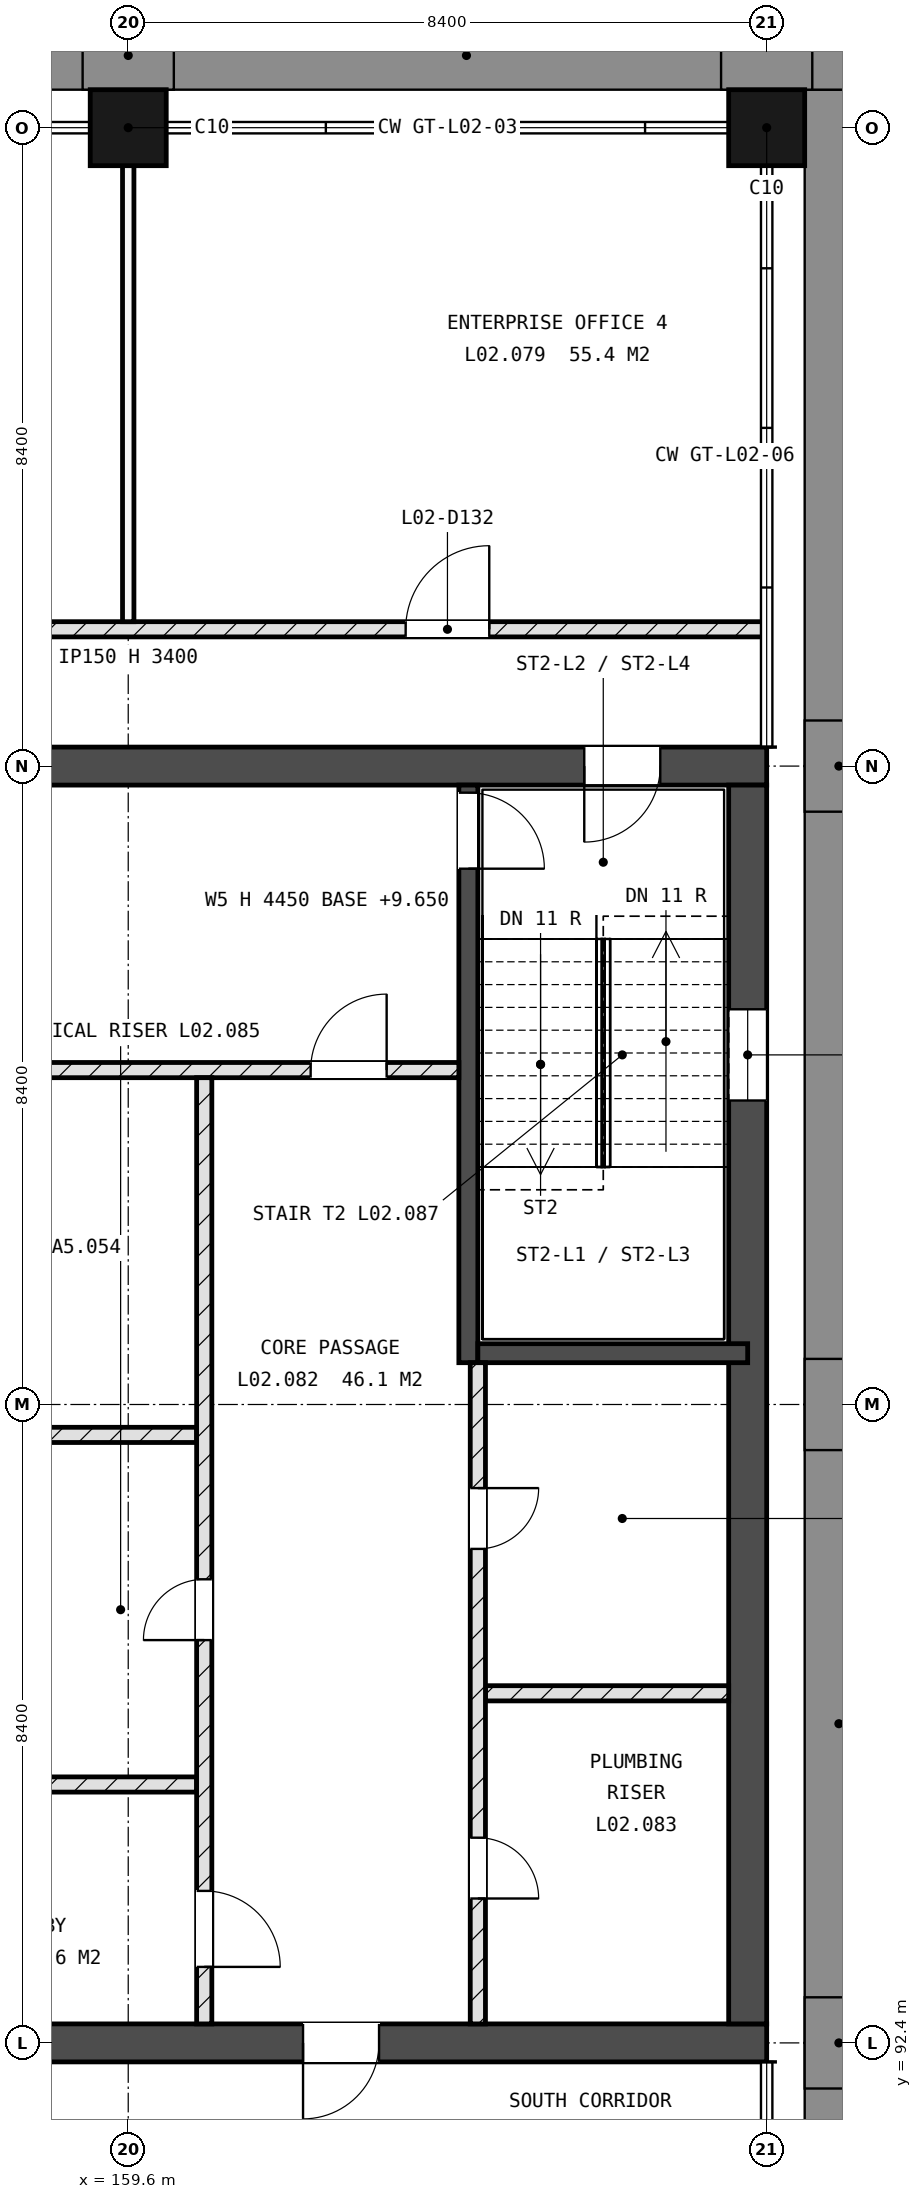
"""IFC4 building model, lengths in metres.
Left out: names, types, materials, properties, quantities, classifications, styles, units other than length and angle.
Written with IfcOpenShell. Run it as: python <this file> out.ifc"""

import sys

from ifc_helpers import new_model, si_unit, direction, frame, frame_2d, origin, origin_2d, place, context, subcontext, project, spatial, rectangle, extrude, element, fill, save


model = new_model("IFC4")
c1 = context("Model", 3, precision=1e-05, world=origin(), true_north=direction((0.0, 1.0)))
c2 = subcontext(c1, "Body", "Model", "MODEL_VIEW")
j1 = project(units=[si_unit("LENGTHUNIT", "METRE"), si_unit("PLANEANGLEUNIT", "RADIAN")], contexts=[c1])
p1 = place(None, origin())
s1 = spatial("IfcSite", under=j1, at=p1, CompositionType="ELEMENT")
p2 = place(p1, origin())
s2 = spatial("IfcBuilding", under=s1, at=p2, CompositionType="ELEMENT")
p3 = place(p2, frame((0.0, 0.0, 9.9)))
s3 = spatial("IfcBuildingStorey", under=s2, at=p3, CompositionType="ELEMENT", Elevation=9.9)
for number, where, z_axis, x_axis in (
    (1, (159.6, 117.6, -0.25), (0.0, 0.0, 1.0), (1.0, 0.0, 0.0)),
    (2, (168.0, 117.6, -0.25), (0.0, 0.0, 1.0), (1.0, 0.0, 0.0)),
):
    element("IfcColumn", number, at=place(p3, frame(where, z_axis=z_axis, x_axis=x_axis)), inside=s3, PredefinedType="COLUMN", context=c2, shape_type="SweptSolid", body=[
        extrude(rectangle(XDim=1.0, YDim=1.0, at=origin_2d()), origin(), (0.0, 0.0, 1.0), 4.45),
    ])
p4 = place(p3, frame((142.8, 92.4, -0.25), z_axis=(0.0, 0.0, 1.0), x_axis=(1.0, 0.0, 0.0)))
e3 = element("IfcWall", 3, at=p4, inside=s3, PredefinedType="SHEAR", context=c2, shape_type="SweptSolid", body=[
    extrude(rectangle(XDim=25.2, YDim=0.5, at=frame_2d((12.6, 0.0))), origin(), (0.0, 0.0, 1.0), 4.45),
])
p5 = place(p4, frame((1.4, 0.0, 0.25)))
e4 = element("IfcOpeningElement", 4, at=p5, cuts=e3, PredefinedType="OPENING", context=c2, shape_type="SweptSolid", body=[
    extrude(rectangle(XDim=1.0, YDim=2.1, at=frame_2d((0.5, 1.05))), frame((0.0, 0.26, 0.0), z_axis=(0.0, -1.0, 0.0), x_axis=(1.0, 0.0, 0.0)), (0.0, 0.0, 1.0), 0.52),
])
p6 = place(p4, frame((19.1, 0.0, 0.25)))
e5 = element("IfcOpeningElement", 5, at=p6, cuts=e3, PredefinedType="OPENING", context=c2, shape_type="SweptSolid", body=[
    extrude(rectangle(XDim=1.0, YDim=2.1, at=frame_2d((0.5, 1.05))), frame((0.0, 0.26, 0.0), z_axis=(0.0, -1.0, 0.0), x_axis=(1.0, 0.0, 0.0)), (0.0, 0.0, 1.0), 0.52),
])
p7 = place(p4, frame((10.4, 0.0, 0.25)))
e6 = element("IfcOpeningElement", 6, at=p7, cuts=e3, PredefinedType="OPENING", context=c2, shape_type="SweptSolid", body=[
    extrude(rectangle(XDim=1.0, YDim=2.1, at=frame_2d((0.5, 1.05))), frame((0.0, 0.26, 0.0), z_axis=(0.0, -1.0, 0.0), x_axis=(1.0, 0.0, 0.0)), (0.0, 0.0, 1.0), 0.52),
])
p8 = place(p3, frame((142.8, 109.2, -0.25), z_axis=(0.0, 0.0, 1.0), x_axis=(1.0, 0.0, 0.0)))
e7 = element("IfcWall", 7, at=p8, inside=s3, PredefinedType="SHEAR", context=c2, shape_type="SweptSolid", body=[
    extrude(rectangle(XDim=25.2, YDim=0.5, at=frame_2d((12.6, 0.0))), origin(), (0.0, 0.0, 1.0), 4.45),
])
p9 = place(p8, frame((22.8, 0.0, 0.25)))
e8 = element("IfcOpeningElement", 8, at=p9, cuts=e7, PredefinedType="OPENING", context=c2, shape_type="SweptSolid", body=[
    extrude(rectangle(XDim=1.0, YDim=2.1, at=frame_2d((0.5, 1.05))), frame((0.0, 0.26, 0.0), z_axis=(0.0, -1.0, 0.0), x_axis=(1.0, 0.0, 0.0)), (0.0, 0.0, 1.0), 0.52),
])
p10 = place(p8, frame((1.5, 0.0, 0.25)))
e9 = element("IfcOpeningElement", 9, at=p10, cuts=e7, PredefinedType="OPENING", context=c2, shape_type="SweptSolid", body=[
    extrude(rectangle(XDim=0.8, YDim=2.1, at=frame_2d((0.4, 1.05))), frame((0.0, 0.26, 0.0), z_axis=(0.0, -1.0, 0.0), x_axis=(1.0, 0.0, 0.0)), (0.0, 0.0, 1.0), 0.52),
])
p11 = place(p8, frame((13.4, 0.0, 0.25)))
e10 = element("IfcOpeningElement", 10, at=p11, cuts=e7, PredefinedType="OPENING", context=c2, shape_type="SweptSolid", body=[
    extrude(rectangle(XDim=1.0, YDim=2.1, at=frame_2d((0.5, 1.05))), frame((0.0, 0.26, 0.0), z_axis=(0.0, -1.0, 0.0), x_axis=(1.0, 0.0, 0.0)), (0.0, 0.0, 1.0), 0.52),
])
p12 = place(p3, frame((167.75, 92.65, -0.25), z_axis=(0.0, 0.0, 1.0), x_axis=(0.0, 1.0, 0.0)))
e11 = element("IfcWall", 11, at=p12, inside=s3, PredefinedType="SHEAR", context=c2, shape_type="SweptSolid", body=[
    extrude(rectangle(XDim=16.3, YDim=0.5, at=frame_2d((8.15, 0.0))), origin(), (0.0, 0.0, 1.0), 4.45),
])
p13 = place(p12, frame((12.15, 0.0, 1.85)))
e12 = element("IfcOpeningElement", 12, at=p13, cuts=e11, PredefinedType="OPENING", context=c2, shape_type="SweptSolid", body=[
    extrude(rectangle(XDim=1.2, YDim=0.9, at=frame_2d((0.6, 0.45))), frame((0.0, 0.26, 0.0), z_axis=(0.0, -1.0, 0.0), x_axis=(1.0, 0.0, 0.0)), (0.0, 0.0, 1.0), 0.52),
])
p14 = place(p3, frame((164.075, 101.35, -0.25), z_axis=(0.0, 0.0, 1.0), x_axis=(0.0, 1.0, 0.0)))
e13 = element("IfcWall", 13, at=p14, inside=s3, PredefinedType="SHEAR", context=c2, shape_type="SweptSolid", body=[
    extrude(rectangle(XDim=7.6, YDim=0.25, at=frame_2d((3.8, 0.0))), origin(), (0.0, 0.0, 1.0), 4.45),
])
p15 = place(p14, frame((6.5, 0.0, 0.25)))
e14 = element("IfcOpeningElement", 14, at=p15, cuts=e13, PredefinedType="OPENING", context=c2, shape_type="SweptSolid", body=[
    extrude(rectangle(XDim=1.0, YDim=2.1, at=frame_2d((0.5, 1.05))), frame((0.0, 0.135, 0.0), z_axis=(0.0, -1.0, 0.0), x_axis=(1.0, 0.0, 0.0)), (0.0, 0.0, 1.0), 0.27),
])
p16 = place(p3, frame((164.2, 101.475, -0.25), z_axis=(0.0, 0.0, 1.0), x_axis=(1.0, 0.0, 0.0)))
e15 = element("IfcWall", 15, at=p16, inside=s3, PredefinedType="SHEAR", context=c2, shape_type="SweptSolid", body=[
    extrude(rectangle(XDim=3.55, YDim=0.25, at=frame_2d((1.775, 0.0))), origin(), (0.0, 0.0, 1.0), 4.45),
])
p17 = place(p3, frame((158.25, 95.8, 0.0), z_axis=(0.0, 0.0, 1.0), x_axis=(1.0, 0.0, 0.0)))
e16 = element("IfcWall", 16, at=p17, inside=s3, PredefinedType="SOLIDWALL", context=c2, shape_type="SweptSolid", body=[
    extrude(rectangle(XDim=2.25, YDim=0.2, at=frame_2d((1.125, 0.0))), origin(), (0.0, 0.0, 1.0), 4.2),
])
p18 = place(p3, frame((164.3, 97.0, 0.0), z_axis=(0.0, 0.0, 1.0), x_axis=(1.0, 0.0, 0.0)))
e17 = element("IfcWall", 17, at=p18, inside=s3, PredefinedType="SOLIDWALL", context=c2, shape_type="SweptSolid", body=[
    extrude(rectangle(XDim=3.2, YDim=0.2, at=frame_2d((1.6, 0.0))), origin(), (0.0, 0.0, 1.0), 4.2),
])
p19 = place(p3, frame((146.5, 100.4, 0.0), z_axis=(0.0, 0.0, 1.0), x_axis=(1.0, 0.0, 0.0)))
e18 = element("IfcWall", 18, at=p19, inside=s3, PredefinedType="SOLIDWALL", context=c2, shape_type="SweptSolid", body=[
    extrude(rectangle(XDim=14.0, YDim=0.2, at=frame_2d((7.0, 0.0))), origin(), (0.0, 0.0, 1.0), 4.2),
])
p20 = place(p3, frame((143.3, 105.2, 0.0), z_axis=(0.0, 0.0, 1.0), x_axis=(1.0, 0.0, 0.0)))
e19 = element("IfcWall", 19, at=p20, inside=s3, PredefinedType="SOLIDWALL", context=c2, shape_type="SweptSolid", body=[
    extrude(rectangle(XDim=20.65, YDim=0.2, at=frame_2d((10.325, 0.0))), origin(), (0.0, 0.0, 1.0), 4.2),
])
p21 = place(p20, frame((11.4, 0.0, 0.0)))
e20 = element("IfcOpeningElement", 20, at=p21, cuts=e19, PredefinedType="OPENING", context=c2, shape_type="SweptSolid", body=[
    extrude(rectangle(XDim=0.8, YDim=2.1, at=frame_2d((0.4, 1.05))), frame((0.0, 0.11, 0.0), z_axis=(0.0, -1.0, 0.0), x_axis=(1.0, 0.0, 0.0)), (0.0, 0.0, 1.0), 0.22),
])
p22 = place(p20, frame((18.7, 0.0, 0.0)))
e21 = element("IfcOpeningElement", 21, at=p22, cuts=e19, PredefinedType="OPENING", context=c2, shape_type="SweptSolid", body=[
    extrude(rectangle(XDim=1.0, YDim=2.1, at=frame_2d((0.5, 1.05))), frame((0.0, 0.11, 0.0), z_axis=(0.0, -1.0, 0.0), x_axis=(1.0, 0.0, 0.0)), (0.0, 0.0, 1.0), 0.22),
])
p23 = place(p3, frame((142.8, 111.0, 0.0), z_axis=(0.0, 0.0, 1.0), x_axis=(1.0, 0.0, 0.0)))
e22 = element("IfcWall", 22, at=p23, inside=s3, PredefinedType="SOLIDWALL", context=c2, shape_type="SweptSolid", body=[
    extrude(rectangle(XDim=25.2, YDim=0.2, at=frame_2d((12.6, 0.0))), origin(), (0.0, 0.0, 1.0), 4.2),
])
p24 = place(p23, frame((3.65, 0.0, 0.0)))
e23 = element("IfcOpeningElement", 23, at=p24, cuts=e22, PredefinedType="OPENING", context=c2, shape_type="SweptSolid", body=[
    extrude(rectangle(XDim=1.1, YDim=2.25, at=frame_2d((0.55, 1.125))), frame((0.0, 0.11, 0.0), z_axis=(0.0, -1.0, 0.0), x_axis=(1.0, 0.0, 0.0)), (0.0, 0.0, 1.0), 0.22),
])
p25 = place(p23, frame((12.05, 0.0, 0.0)))
e24 = element("IfcOpeningElement", 24, at=p25, cuts=e22, PredefinedType="OPENING", context=c2, shape_type="SweptSolid", body=[
    extrude(rectangle(XDim=1.1, YDim=2.25, at=frame_2d((0.55, 1.125))), frame((0.0, 0.11, 0.0), z_axis=(0.0, -1.0, 0.0), x_axis=(1.0, 0.0, 0.0)), (0.0, 0.0, 1.0), 0.22),
])
p26 = place(p23, frame((20.45, 0.0, 0.0)))
e25 = element("IfcOpeningElement", 25, at=p26, cuts=e22, PredefinedType="OPENING", context=c2, shape_type="SweptSolid", body=[
    extrude(rectangle(XDim=1.1, YDim=2.25, at=frame_2d((0.55, 1.125))), frame((0.0, 0.11, 0.0), z_axis=(0.0, -1.0, 0.0), x_axis=(1.0, 0.0, 0.0)), (0.0, 0.0, 1.0), 0.22),
])
p27 = place(p3, frame((159.6, 111.1, 0.0), z_axis=(0.0, 0.0, 1.0), x_axis=(0.0, 1.0, 0.0)))
e26 = element("IfcWall", 26, at=p27, inside=s3, PredefinedType="PARTITIONING", context=c2, shape_type="SweptSolid", body=[
    extrude(rectangle(XDim=6.5, YDim=0.15, at=frame_2d((3.25, 0.0))), origin(), (0.0, 0.0, 1.0), 3.4),
])
p28 = place(p3, frame((160.6, 92.65, 0.0), z_axis=(0.0, 0.0, 1.0), x_axis=(0.0, 1.0, 0.0)))
e27 = element("IfcWall", 27, at=p28, inside=s3, PredefinedType="SOLIDWALL", context=c2, shape_type="SweptSolid", body=[
    extrude(rectangle(XDim=12.45, YDim=0.2, at=frame_2d((6.225, 0.0))), origin(), (0.0, 0.0, 1.0), 4.2),
])
p29 = place(p28, frame((5.05, 0.0, 0.0)))
e28 = element("IfcOpeningElement", 28, at=p29, cuts=e27, PredefinedType="OPENING", context=c2, shape_type="SweptSolid", body=[
    extrude(rectangle(XDim=0.8, YDim=2.1, at=frame_2d((0.4, 1.05))), frame((0.0, 0.11, 0.0), z_axis=(0.0, -1.0, 0.0), x_axis=(1.0, 0.0, 0.0)), (0.0, 0.0, 1.0), 0.22),
])
p30 = place(p28, frame((0.75, 0.0, 0.0)))
e29 = element("IfcOpeningElement", 29, at=p30, cuts=e27, PredefinedType="OPENING", context=c2, shape_type="SweptSolid", body=[
    extrude(rectangle(XDim=1.0, YDim=2.1, at=frame_2d((0.5, 1.05))), frame((0.0, 0.11, 0.0), z_axis=(0.0, -1.0, 0.0), x_axis=(1.0, 0.0, 0.0)), (0.0, 0.0, 1.0), 0.22),
])
p31 = place(p3, frame((164.2, 92.65, 0.0), z_axis=(0.0, 0.0, 1.0), x_axis=(0.0, 1.0, 0.0)))
e30 = element("IfcWall", 30, at=p31, inside=s3, PredefinedType="SOLIDWALL", context=c2, shape_type="SweptSolid", body=[
    extrude(rectangle(XDim=8.7, YDim=0.2, at=frame_2d((4.35, 0.0))), origin(), (0.0, 0.0, 1.0), 4.2),
])
p32 = place(p31, frame((1.65, 0.0, 0.0)))
e31 = element("IfcOpeningElement", 31, at=p32, cuts=e30, PredefinedType="OPENING", context=c2, shape_type="SweptSolid", body=[
    extrude(rectangle(XDim=0.8, YDim=2.1, at=frame_2d((0.4, 1.05))), frame((0.0, 0.11, 0.0), z_axis=(0.0, -1.0, 0.0), x_axis=(1.0, 0.0, 0.0)), (0.0, 0.0, 1.0), 0.22),
])
p33 = place(p31, frame((6.25, 0.0, 0.0)))
e32 = element("IfcOpeningElement", 32, at=p33, cuts=e30, PredefinedType="OPENING", context=c2, shape_type="SweptSolid", body=[
    extrude(rectangle(XDim=0.8, YDim=2.1, at=frame_2d((0.4, 1.05))), frame((0.0, 0.11, 0.0), z_axis=(0.0, -1.0, 0.0), x_axis=(1.0, 0.0, 0.0)), (0.0, 0.0, 1.0), 0.22),
])
p34 = place(p13, origin())
e33 = element("IfcWindow", 33, at=p34, inside=s3, PartitioningType="SINGLE_PANEL", PredefinedType="WINDOW", context=c2, shape_type="SweptSolid", body=[
    extrude(rectangle(XDim=1.2, YDim=0.9, at=frame_2d((0.6, 0.45))), frame((0.0, 0.03, 0.0), z_axis=(0.0, -1.0, 0.0), x_axis=(1.0, 0.0, 0.0)), (0.0, 0.0, 1.0), 0.06),
])
fill(e12, e33)
p35 = place(p15, origin())
e34 = element("IfcDoor", 34, at=p35, inside=s3, OperationType="SINGLE_SWING_LEFT", PredefinedType="DOOR", context=c2, shape_type="SweptSolid", body=[
    extrude(rectangle(XDim=1.0, YDim=2.1, at=frame_2d((0.5, 1.05))), frame((0.0, 0.025, 0.0), z_axis=(0.0, -1.0, 0.0), x_axis=(1.0, 0.0, 0.0)), (0.0, 0.0, 1.0), 0.05),
])
fill(e14, e34)
p36 = place(p9, origin())
e35 = element("IfcDoor", 35, at=p36, inside=s3, OperationType="SINGLE_SWING_LEFT", PredefinedType="DOOR", context=c2, shape_type="SweptSolid", body=[
    extrude(rectangle(XDim=1.0, YDim=2.1, at=frame_2d((0.5, 1.05))), frame((0.0, 0.025, 0.0), z_axis=(0.0, -1.0, 0.0), x_axis=(1.0, 0.0, 0.0)), (0.0, 0.0, 1.0), 0.05),
])
fill(e8, e35)
p37 = place(p26, origin())
e36 = element("IfcDoor", 36, at=p37, inside=s3, OperationType="SINGLE_SWING_LEFT", PredefinedType="DOOR", context=c2, shape_type="SweptSolid", body=[
    extrude(rectangle(XDim=1.1, YDim=2.25, at=frame_2d((0.55, 1.125))), frame((0.0, 0.025, 0.0), z_axis=(0.0, -1.0, 0.0), x_axis=(1.0, 0.0, 0.0)), (0.0, 0.0, 1.0), 0.05),
])
fill(e25, e36)
p38 = place(p32, origin())
e37 = element("IfcDoor", 37, at=p38, inside=s3, OperationType="SINGLE_SWING_LEFT", PredefinedType="DOOR", context=c2, shape_type="SweptSolid", body=[
    extrude(rectangle(XDim=0.8, YDim=2.1, at=frame_2d((0.4, 1.05))), frame((0.0, 0.025, 0.0), z_axis=(0.0, -1.0, 0.0), x_axis=(1.0, 0.0, 0.0)), (0.0, 0.0, 1.0), 0.05),
])
fill(e31, e37)
p39 = place(p33, origin())
e38 = element("IfcDoor", 38, at=p39, inside=s3, OperationType="SINGLE_SWING_RIGHT", PredefinedType="DOOR", context=c2, shape_type="SweptSolid", body=[
    extrude(rectangle(XDim=0.8, YDim=2.1, at=frame_2d((0.4, 1.05))), frame((0.0, 0.025, 0.0), z_axis=(0.0, -1.0, 0.0), x_axis=(1.0, 0.0, 0.0)), (0.0, 0.0, 1.0), 0.05),
])
fill(e32, e38)
p40 = place(p29, origin())
e39 = element("IfcDoor", 39, at=p40, inside=s3, OperationType="SINGLE_SWING_RIGHT", PredefinedType="DOOR", context=c2, shape_type="SweptSolid", body=[
    extrude(rectangle(XDim=0.8, YDim=2.1, at=frame_2d((0.4, 1.05))), frame((0.0, 0.025, 0.0), z_axis=(0.0, -1.0, 0.0), x_axis=(1.0, 0.0, 0.0)), (0.0, 0.0, 1.0), 0.05),
])
fill(e28, e39)
p41 = place(p6, origin())
e40 = element("IfcDoor", 40, at=p41, inside=s3, OperationType="SINGLE_SWING_LEFT", PredefinedType="DOOR", context=c2, shape_type="SweptSolid", body=[
    extrude(rectangle(XDim=1.0, YDim=2.1, at=frame_2d((0.5, 1.05))), frame((0.0, 0.025, 0.0), z_axis=(0.0, -1.0, 0.0), x_axis=(1.0, 0.0, 0.0)), (0.0, 0.0, 1.0), 0.05),
])
fill(e5, e40)
p42 = place(p30, origin())
e41 = element("IfcDoor", 41, at=p42, inside=s3, OperationType="SINGLE_SWING_LEFT", PredefinedType="DOOR", context=c2, shape_type="SweptSolid", body=[
    extrude(rectangle(XDim=1.0, YDim=2.1, at=frame_2d((0.5, 1.05))), frame((0.0, 0.025, 0.0), z_axis=(0.0, -1.0, 0.0), x_axis=(1.0, 0.0, 0.0)), (0.0, 0.0, 1.0), 0.05),
])
fill(e29, e41)
p43 = place(p22, origin())
e42 = element("IfcDoor", 42, at=p43, inside=s3, OperationType="SINGLE_SWING_LEFT", PredefinedType="DOOR", context=c2, shape_type="SweptSolid", body=[
    extrude(rectangle(XDim=1.0, YDim=2.1, at=frame_2d((0.5, 1.05))), frame((0.0, 0.025, 0.0), z_axis=(0.0, -1.0, 0.0), x_axis=(1.0, 0.0, 0.0)), (0.0, 0.0, 1.0), 0.05),
])
fill(e21, e42)
save(model, sys.argv[1])
